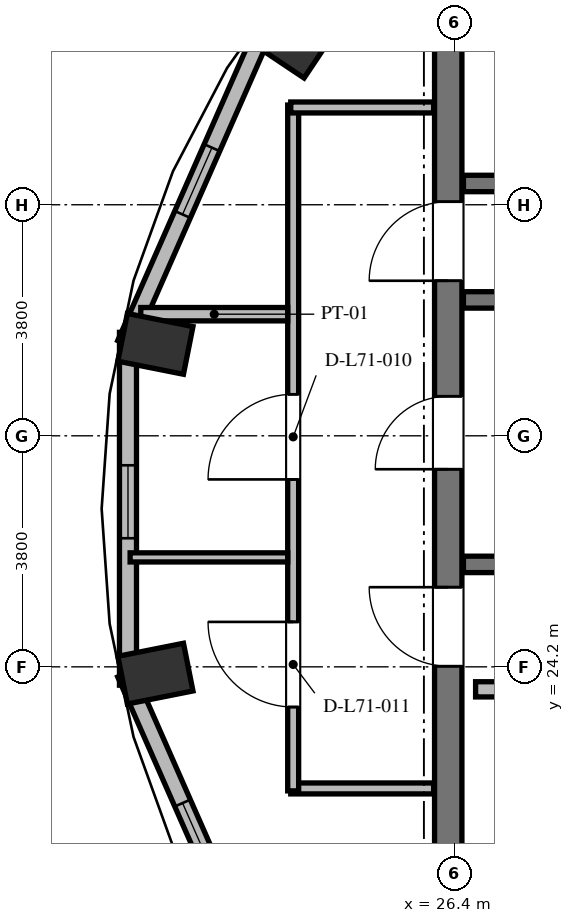
"""IFC4 building model, lengths in metres.
Left out: names, types, materials, properties, quantities, classifications, styles, units other than length and angle.
Written with IfcOpenShell. Run it as: python <this file> out.ifc"""

import sys

from ifc_helpers import new_model, si_unit, direction, frame, frame_2d, origin, origin_2d, place, context, subcontext, project, spatial, rectangle, extrude, element, fill, save


model = new_model("IFC4")
c1 = context("Model", 3, precision=1e-05, world=origin(), true_north=direction((0.0, 1.0)))
c2 = subcontext(c1, "Body", "Model", "MODEL_VIEW")
j1 = project(units=[si_unit("LENGTHUNIT", "METRE"), si_unit("PLANEANGLEUNIT", "RADIAN")], contexts=[c1])
p1 = place(None, origin())
s1 = spatial("IfcSite", under=j1, at=p1, CompositionType="ELEMENT")
p2 = place(p1, origin())
s2 = spatial("IfcBuilding", under=s1, at=p2, CompositionType="ELEMENT")
p3 = place(p2, frame((0.0, 0.0, 273.264)))
s3 = spatial("IfcBuildingStorey", under=s2, at=p3, CompositionType="ELEMENT", Elevation=273.264)
for number, where, z_axis, x_axis in (
    (1, (23.694, 34.522, 0.0), (0.0, 0.0, 1.0), (-0.831, 0.556, 0.0)),
    (2, (21.484, 29.512, 0.0), (0.0, 0.0, 1.0), (-0.981, 0.195, 0.0)),
    (3, (21.484, 24.088, 0.0), (0.0, 0.0, 1.0), (-0.981, -0.195, 0.0)),
):
    element("IfcColumn", number, at=place(p3, frame(where, z_axis=z_axis, x_axis=x_axis)), inside=s3, PredefinedType="COLUMN", context=c2, shape_type="SweptSolid", body=[
        extrude(rectangle(XDim=1.1, YDim=0.8, at=origin_2d()), origin(), (0.0, 0.0, 1.0), 3.648),
    ])
p4 = place(p3, frame((26.3, 20.95, 0.0), z_axis=(0.0, 0.0, 1.0), x_axis=(0.0, 1.0, 0.0)))
e4 = element("IfcWall", 4, at=p4, inside=s3, PredefinedType="SHEAR", context=c2, shape_type="SweptSolid", body=[
    extrude(rectangle(XDim=14.1, YDim=0.45, at=frame_2d((7.05, 0.0))), origin(), (0.0, 0.0, 1.0), 3.648),
])
p5 = place(p4, frame((6.5, 0.0, 0.0)))
e5 = element("IfcOpeningElement", 5, at=p5, cuts=e4, PredefinedType="OPENING", context=c2, shape_type="SweptSolid", body=[
    extrude(rectangle(XDim=1.2, YDim=2.15, at=frame_2d((0.6, 1.075))), frame((0.0, 0.235, 0.0), z_axis=(0.0, -1.0, 0.0), x_axis=(1.0, 0.0, 0.0)), (0.0, 0.0, 1.0), 0.47),
])
p6 = place(p4, frame((9.6, 0.0, 0.0)))
e6 = element("IfcOpeningElement", 6, at=p6, cuts=e4, PredefinedType="OPENING", context=c2, shape_type="SweptSolid", body=[
    extrude(rectangle(XDim=1.3, YDim=2.2, at=frame_2d((0.65, 1.1))), frame((0.0, 0.235, 0.0), z_axis=(0.0, -1.0, 0.0), x_axis=(1.0, 0.0, 0.0)), (0.0, 0.0, 1.0), 0.47),
])
p7 = place(p4, frame((3.26, 0.0, 0.0)))
e7 = element("IfcOpeningElement", 7, at=p7, cuts=e4, PredefinedType="OPENING", context=c2, shape_type="SweptSolid", body=[
    extrude(rectangle(XDim=1.3, YDim=2.2, at=frame_2d((0.65, 1.1))), frame((0.0, 0.235, 0.0), z_axis=(0.0, -1.0, 0.0), x_axis=(1.0, 0.0, 0.0)), (0.0, 0.0, 1.0), 0.47),
])
p8 = place(p3, frame((23.352, 34.869, 0.0), z_axis=(0.0, 0.0, 1.0), x_axis=(-0.402882523888, -0.915251698685, 0.0)))
e8 = element("IfcWall", 8, at=p8, inside=s3, PredefinedType="SOLIDWALL", context=c2, shape_type="SweptSolid", body=[
    extrude(rectangle(XDim=5.856, YDim=0.28, at=frame_2d((2.928, 0.0))), origin(), (0.0, 0.0, 1.0), 3.448),
])
p9 = place(p8, frame((2.328, 0.0, 0.85)))
e9 = element("IfcOpeningElement", 9, at=p9, cuts=e8, PredefinedType="OPENING", context=c2, shape_type="SweptSolid", body=[
    extrude(rectangle(XDim=1.2, YDim=1.8, at=frame_2d((0.6, 0.9))), frame((0.0, 0.15, 0.0), z_axis=(0.0, -1.0, 0.0), x_axis=(1.0, 0.0, 0.0)), (0.0, 0.0, 1.0), 0.3),
])
p10 = place(p3, frame((21.033, 29.701, 0.0), z_axis=(0.0, 0.0, 1.0), x_axis=(0.0, -1.0, 0.0)))
e10 = element("IfcWall", 10, at=p10, inside=s3, PredefinedType="SOLIDWALL", context=c2, shape_type="SweptSolid", body=[
    extrude(rectangle(XDim=5.803, YDim=0.28, at=frame_2d((2.901, 0.0))), origin(), (0.0, 0.0, 1.0), 3.448),
])
p11 = place(p10, frame((2.187, 0.0, 0.85)))
e11 = element("IfcOpeningElement", 11, at=p11, cuts=e10, PredefinedType="OPENING", context=c2, shape_type="SweptSolid", body=[
    extrude(rectangle(XDim=1.2, YDim=1.8, at=frame_2d((0.6, 0.9))), frame((0.0, 0.15, 0.0), z_axis=(0.0, -1.0, 0.0), x_axis=(1.0, 0.0, 0.0)), (0.0, 0.0, 1.0), 0.3),
])
p12 = place(p3, frame((20.993, 24.09, 0.0), z_axis=(0.0, 0.0, 1.0), x_axis=(0.402867150469, -0.91525846572, 0.0)))
e12 = element("IfcWall", 12, at=p12, inside=s3, PredefinedType="SOLIDWALL", context=c2, shape_type="SweptSolid", body=[
    extrude(rectangle(XDim=5.856, YDim=0.28, at=frame_2d((2.928, 0.0))), origin(), (0.0, 0.0, 1.0), 3.448),
])
p13 = place(p12, frame((2.328, 0.0, 0.85)))
e13 = element("IfcOpeningElement", 13, at=p13, cuts=e12, PredefinedType="OPENING", context=c2, shape_type="SweptSolid", body=[
    extrude(rectangle(XDim=1.2, YDim=1.8, at=frame_2d((0.6, 0.9))), frame((0.0, 0.15, 0.0), z_axis=(0.0, -1.0, 0.0), x_axis=(1.0, 0.0, 0.0)), (0.0, 0.0, 1.0), 0.3),
])
for number, where, z_axis, x_axis in (
    (14, (26.55, 30.235, 0.0), (0.0, 0.0, 1.0), (1.0, 0.0, 0.0)),
    (15, (26.55, 25.885, 0.0), (0.0, 0.0, 1.0), (1.0, 0.0, 0.0)),
):
    element("IfcWall", number, at=place(p3, frame(where, z_axis=z_axis, x_axis=x_axis)), inside=s3, PredefinedType="SHEAR", context=c2, shape_type="SweptSolid", body=[
        extrude(rectangle(XDim=7.985, YDim=0.27, at=frame_2d((3.992, 0.0))), origin(), (0.0, 0.0, 1.0), 3.648),
    ])
p14 = place(p3, frame((26.55, 32.15, 0.0), z_axis=(0.0, 0.0, 1.0), x_axis=(1.0, 0.0, 0.0)))
e16 = element("IfcWall", 16, at=p14, inside=s3, PredefinedType="SHEAR", context=c2, shape_type="SweptSolid", body=[
    extrude(rectangle(XDim=16.4, YDim=0.27, at=frame_2d((8.2, 0.0))), origin(), (0.0, 0.0, 1.0), 3.648),
])
p15 = place(p14, frame((2.175, 0.0, 0.0)))
e17 = element("IfcOpeningElement", 17, at=p15, cuts=e16, PredefinedType="OPENING", context=c2, shape_type="SweptSolid", body=[
    extrude(rectangle(XDim=1.05, YDim=2.15, at=frame_2d((0.525, 1.075))), frame((0.0, 0.145, 0.0), z_axis=(0.0, -1.0, 0.0), x_axis=(1.0, 0.0, 0.0)), (0.0, 0.0, 1.0), 0.29),
])
p16 = place(p14, frame((7.575, 0.0, 0.0)))
e18 = element("IfcOpeningElement", 18, at=p16, cuts=e16, PredefinedType="OPENING", context=c2, shape_type="SweptSolid", body=[
    extrude(rectangle(XDim=1.05, YDim=2.15, at=frame_2d((0.525, 1.075))), frame((0.0, 0.145, 0.0), z_axis=(0.0, -1.0, 0.0), x_axis=(1.0, 0.0, 0.0)), (0.0, 0.0, 1.0), 0.29),
])
p17 = place(p14, frame((11.9, 0.0, 0.0)))
e19 = element("IfcOpeningElement", 19, at=p17, cuts=e16, PredefinedType="OPENING", context=c2, shape_type="SweptSolid", body=[
    extrude(rectangle(XDim=1.1, YDim=2.2, at=frame_2d((0.55, 1.1))), frame((0.0, 0.145, 0.0), z_axis=(0.0, -1.0, 0.0), x_axis=(1.0, 0.0, 0.0)), (0.0, 0.0, 1.0), 0.29),
])
p18 = place(p14, frame((14.5, 0.0, 0.0)))
e20 = element("IfcOpeningElement", 20, at=p18, cuts=e16, PredefinedType="OPENING", context=c2, shape_type="SweptSolid", body=[
    extrude(rectangle(XDim=1.1, YDim=2.2, at=frame_2d((0.55, 1.1))), frame((0.0, 0.145, 0.0), z_axis=(0.0, -1.0, 0.0), x_axis=(1.0, 0.0, 0.0)), (0.0, 0.0, 1.0), 0.29),
])
p19 = place(p3, frame((26.75, 23.83, 0.0), z_axis=(0.0, 0.0, 1.0), x_axis=(1.0, 0.0, 0.0)))
e21 = element("IfcWall", 21, at=p19, inside=s3, PredefinedType="SOLIDWALL", context=c2, shape_type="SweptSolid", body=[
    extrude(rectangle(XDim=16.2, YDim=0.25, at=frame_2d((8.1, 0.0))), origin(), (0.0, 0.0, 1.0), 3.448),
])
p20 = place(p19, frame((4.75, 0.0, 0.0)))
e22 = element("IfcOpeningElement", 22, at=p20, cuts=e21, PredefinedType="OPENING", context=c2, shape_type="SweptSolid", body=[
    extrude(rectangle(XDim=1.4, YDim=2.2, at=frame_2d((0.7, 1.1))), frame((0.0, 0.135, 0.0), z_axis=(0.0, -1.0, 0.0), x_axis=(1.0, 0.0, 0.0)), (0.0, 0.0, 1.0), 0.27),
])
p21 = place(p19, frame((11.7, 0.0, 0.0)))
e23 = element("IfcOpeningElement", 23, at=p21, cuts=e21, PredefinedType="OPENING", context=c2, shape_type="SweptSolid", body=[
    extrude(rectangle(XDim=1.1, YDim=2.2, at=frame_2d((0.55, 1.1))), frame((0.0, 0.135, 0.0), z_axis=(0.0, -1.0, 0.0), x_axis=(1.0, 0.0, 0.0)), (0.0, 0.0, 1.0), 0.27),
])
p22 = place(p19, frame((14.15, 0.0, 0.0)))
e24 = element("IfcOpeningElement", 24, at=p22, cuts=e21, PredefinedType="OPENING", context=c2, shape_type="SweptSolid", body=[
    extrude(rectangle(XDim=1.4, YDim=2.3, at=frame_2d((0.7, 1.15))), frame((0.0, 0.135, 0.0), z_axis=(0.0, -1.0, 0.0), x_axis=(1.0, 0.0, 0.0)), (0.0, 0.0, 1.0), 0.27),
])
p23 = place(p3, frame((26.06, 22.2, 0.0), z_axis=(0.0, 0.0, 1.0), x_axis=(-1.0, 0.0, 0.0)))
e25 = element("IfcWall", 25, at=p23, inside=s3, PredefinedType="PARTITIONING", context=c2, shape_type="SweptSolid", body=[
    extrude(rectangle(XDim=2.35, YDim=0.18, at=frame_2d((1.175, 0.0))), origin(), (0.0, 0.0, 1.0), 3.448),
])
p24 = place(p3, frame((23.75, 22.16, 0.0), z_axis=(0.0, 0.0, 1.0), x_axis=(0.0, 1.0, 0.0)))
e26 = element("IfcWall", 26, at=p24, inside=s3, PredefinedType="PARTITIONING", context=c2, shape_type="SweptSolid", body=[
    extrude(rectangle(XDim=11.28, YDim=0.18, at=frame_2d((5.64, 0.0))), origin(), (0.0, 0.0, 1.0), 3.448),
])
p25 = place(p24, frame((5.123, 0.0, 0.0)))
e27 = element("IfcOpeningElement", 27, at=p25, cuts=e26, PredefinedType="OPENING", context=c2, shape_type="SweptSolid", body=[
    extrude(rectangle(XDim=1.4, YDim=2.2, at=frame_2d((0.7, 1.1))), frame((0.0, 0.1, 0.0), z_axis=(0.0, -1.0, 0.0), x_axis=(1.0, 0.0, 0.0)), (0.0, 0.0, 1.0), 0.2),
])
p26 = place(p24, frame((1.379, 0.0, 0.0)))
e28 = element("IfcOpeningElement", 28, at=p26, cuts=e26, PredefinedType="OPENING", context=c2, shape_type="SweptSolid", body=[
    extrude(rectangle(XDim=1.4, YDim=2.2, at=frame_2d((0.7, 1.1))), frame((0.0, 0.1, 0.0), z_axis=(0.0, -1.0, 0.0), x_axis=(1.0, 0.0, 0.0)), (0.0, 0.0, 1.0), 0.2),
])
p27 = place(p3, frame((23.71, 33.4, 0.0), z_axis=(0.0, 0.0, 1.0), x_axis=(1.0, 0.0, 0.0)))
e29 = element("IfcWall", 29, at=p27, inside=s3, PredefinedType="PARTITIONING", context=c2, shape_type="SweptSolid", body=[
    extrude(rectangle(XDim=2.35, YDim=0.18, at=frame_2d((1.175, 0.0))), origin(), (0.0, 0.0, 1.0), 3.448),
])
p28 = place(p3, frame((21.068, 26.0, 0.0), z_axis=(0.0, 0.0, 1.0), x_axis=(1.0, 0.0, 0.0)))
e30 = element("IfcWall", 30, at=p28, inside=s3, PredefinedType="PARTITIONING", context=c2, shape_type="SweptSolid", body=[
    extrude(rectangle(XDim=2.592, YDim=0.15, at=frame_2d((1.296, 0.0))), origin(), (0.0, 0.0, 1.0), 3.448),
])
p29 = place(p3, frame((21.244, 30.0, 0.0), z_axis=(0.0, 0.0, 1.0), x_axis=(1.0, 0.0, 0.0)))
e31 = element("IfcWall", 31, at=p29, inside=s3, PredefinedType="PARTITIONING", context=c2, shape_type="SweptSolid", body=[
    extrude(rectangle(XDim=2.416, YDim=0.22, at=frame_2d((1.208, 0.0))), origin(), (0.0, 0.0, 1.0), 3.448),
])
p30 = place(p9, origin())
e32 = element("IfcWindow", 32, at=p30, inside=s3, PartitioningType="SINGLE_PANEL", PredefinedType="WINDOW", context=c2, shape_type="SweptSolid", body=[
    extrude(rectangle(XDim=1.2, YDim=1.8, at=frame_2d((0.6, 0.9))), frame((0.0, 0.03, 0.0), z_axis=(0.0, -1.0, 0.0), x_axis=(1.0, 0.0, 0.0)), (0.0, 0.0, 1.0), 0.06),
])
fill(e9, e32)
p31 = place(p11, origin())
e33 = element("IfcWindow", 33, at=p31, inside=s3, PartitioningType="SINGLE_PANEL", PredefinedType="WINDOW", context=c2, shape_type="SweptSolid", body=[
    extrude(rectangle(XDim=1.2, YDim=1.8, at=frame_2d((0.6, 0.9))), frame((0.0, 0.03, 0.0), z_axis=(0.0, -1.0, 0.0), x_axis=(1.0, 0.0, 0.0)), (0.0, 0.0, 1.0), 0.06),
])
fill(e11, e33)
p32 = place(p13, origin())
e34 = element("IfcWindow", 34, at=p32, inside=s3, PartitioningType="SINGLE_PANEL", PredefinedType="WINDOW", context=c2, shape_type="SweptSolid", body=[
    extrude(rectangle(XDim=1.2, YDim=1.8, at=frame_2d((0.6, 0.9))), frame((0.0, 0.03, 0.0), z_axis=(0.0, -1.0, 0.0), x_axis=(1.0, 0.0, 0.0)), (0.0, 0.0, 1.0), 0.06),
])
fill(e13, e34)
p33 = place(p5, origin())
e35 = element("IfcDoor", 35, at=p33, inside=s3, OperationType="SINGLE_SWING_LEFT", PredefinedType="DOOR", context=c2, shape_type="SweptSolid", body=[
    extrude(rectangle(XDim=1.2, YDim=2.15, at=frame_2d((0.6, 1.075))), frame((0.0, 0.025, 0.0), z_axis=(0.0, -1.0, 0.0), x_axis=(1.0, 0.0, 0.0)), (0.0, 0.0, 1.0), 0.05),
])
fill(e5, e35)
p34 = place(p6, origin())
e36 = element("IfcDoor", 36, at=p34, inside=s3, OperationType="SINGLE_SWING_LEFT", PredefinedType="DOOR", context=c2, shape_type="SweptSolid", body=[
    extrude(rectangle(XDim=1.3, YDim=2.2, at=frame_2d((0.65, 1.1))), frame((0.0, 0.025, 0.0), z_axis=(0.0, -1.0, 0.0), x_axis=(1.0, 0.0, 0.0)), (0.0, 0.0, 1.0), 0.05),
])
fill(e6, e36)
p35 = place(p7, origin())
e37 = element("IfcDoor", 37, at=p35, inside=s3, OperationType="SINGLE_SWING_RIGHT", PredefinedType="DOOR", context=c2, shape_type="SweptSolid", body=[
    extrude(rectangle(XDim=1.3, YDim=2.2, at=frame_2d((0.65, 1.1))), frame((0.0, 0.025, 0.0), z_axis=(0.0, -1.0, 0.0), x_axis=(1.0, 0.0, 0.0)), (0.0, 0.0, 1.0), 0.05),
])
fill(e7, e37)
p36 = place(p25, origin())
e38 = element("IfcDoor", 38, at=p36, inside=s3, OperationType="SINGLE_SWING_LEFT", PredefinedType="DOOR", context=c2, shape_type="SweptSolid", body=[
    extrude(rectangle(XDim=1.4, YDim=2.2, at=frame_2d((0.7, 1.1))), frame((0.0, 0.025, 0.0), z_axis=(0.0, -1.0, 0.0), x_axis=(1.0, 0.0, 0.0)), (0.0, 0.0, 1.0), 0.05),
])
fill(e27, e38)
p37 = place(p26, origin())
e39 = element("IfcDoor", 39, at=p37, inside=s3, OperationType="SINGLE_SWING_RIGHT", PredefinedType="DOOR", context=c2, shape_type="SweptSolid", body=[
    extrude(rectangle(XDim=1.4, YDim=2.2, at=frame_2d((0.7, 1.1))), frame((0.0, 0.025, 0.0), z_axis=(0.0, -1.0, 0.0), x_axis=(1.0, 0.0, 0.0)), (0.0, 0.0, 1.0), 0.05),
])
fill(e28, e39)
save(model, sys.argv[1])
